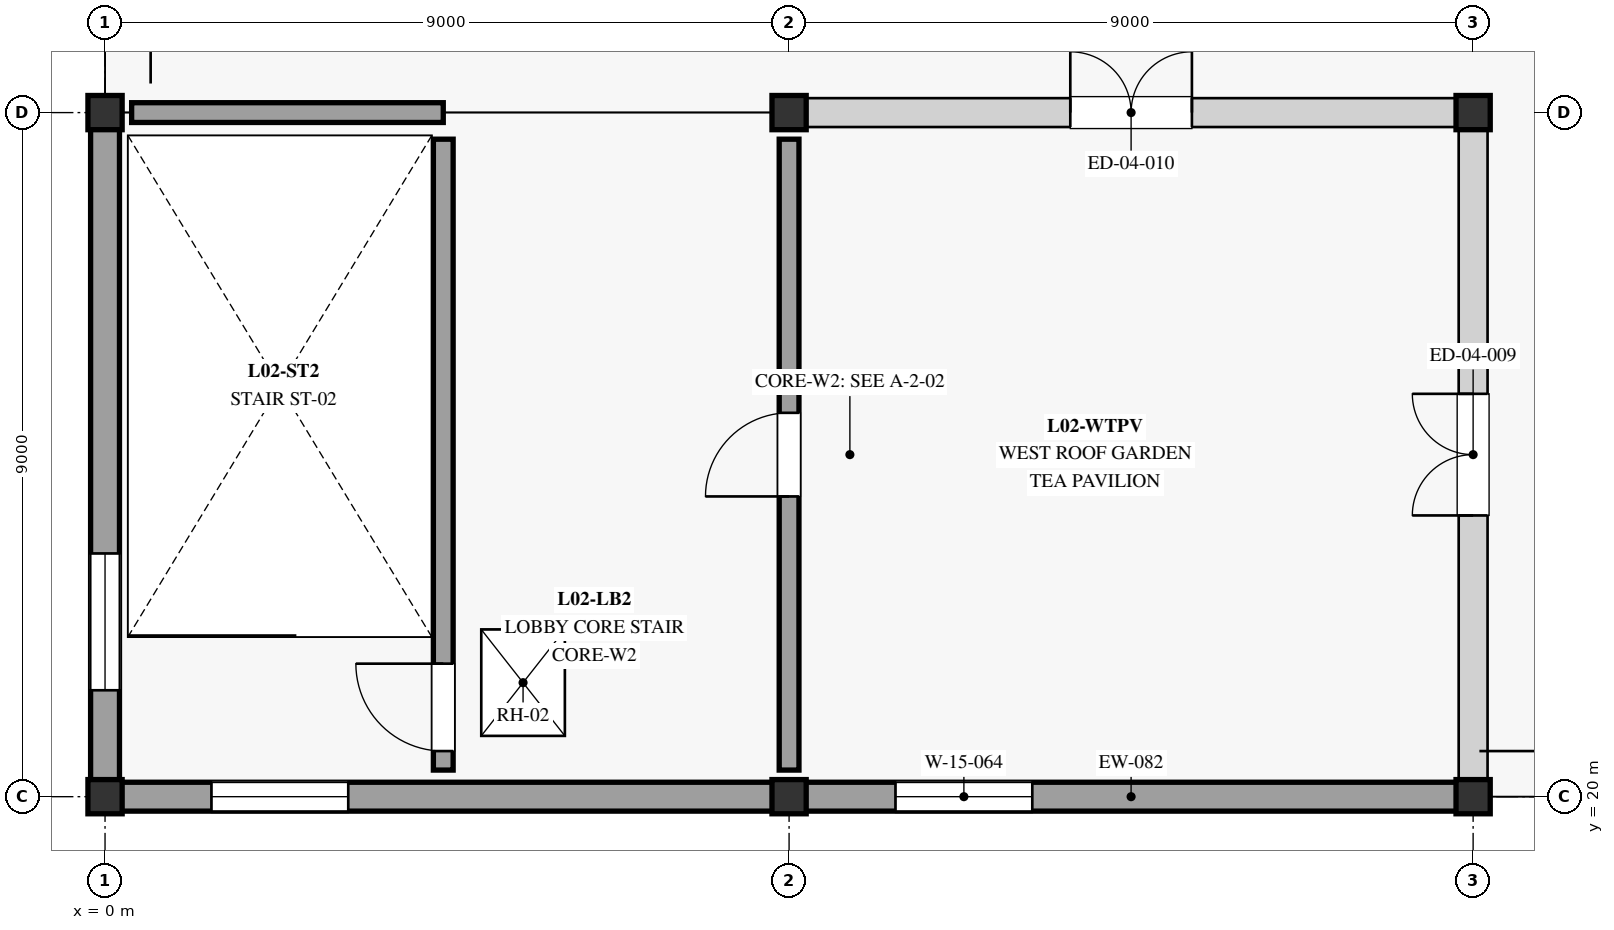
"""IFC4 building model, lengths in metres.
Left out: names, types, materials, properties, quantities, classifications, styles, units other than length and angle.
Written with IfcOpenShell. Run it as: python <this file> out.ifc"""

import sys

from ifc_helpers import new_model, si_unit, direction, frame, frame_2d, origin, origin_2d, place, context, subcontext, project, spatial, rectangle, extrude, element, fill, save


model = new_model("IFC4")
c1 = context("Model", 3, precision=1e-05, world=origin(), true_north=direction((0.0, 1.0)))
c2 = subcontext(c1, "Body", "Model", "MODEL_VIEW")
j1 = project(units=[si_unit("LENGTHUNIT", "METRE"), si_unit("PLANEANGLEUNIT", "RADIAN")], contexts=[c1])
p1 = place(None, origin())
s1 = spatial("IfcSite", under=j1, at=p1, CompositionType="ELEMENT")
p2 = place(p1, origin())
s2 = spatial("IfcBuilding", under=s1, at=p2, CompositionType="ELEMENT")
p3 = place(p2, frame((0.0, 0.0, 8.4)))
s3 = spatial("IfcBuildingStorey", under=s2, at=p3, CompositionType="ELEMENT", Elevation=8.4)
for number, where, z_axis, x_axis in (
    (1, (0.0, 20.0, 0.0), (0.0, 0.0, 1.0), (1.0, 0.0, 0.0)),
    (2, (0.0, 29.0, 0.0), (0.0, 0.0, 1.0), (1.0, 0.0, 0.0)),
    (3, (9.0, 20.0, 0.0), (0.0, 0.0, 1.0), (1.0, 0.0, 0.0)),
    (4, (9.0, 29.0, 0.0), (0.0, 0.0, 1.0), (1.0, 0.0, 0.0)),
    (5, (18.0, 20.0, 0.0), (0.0, 0.0, 1.0), (1.0, 0.0, 0.0)),
    (6, (18.0, 29.0, 0.0), (0.0, 0.0, 1.0), (1.0, 0.0, 0.0)),
):
    element("IfcColumn", number, at=place(p3, frame(where, z_axis=z_axis, x_axis=x_axis)), inside=s3, PredefinedType="COLUMN", context=c2, shape_type="SweptSolid", body=[
        extrude(rectangle(XDim=0.45, YDim=0.45, at=origin_2d()), origin(), (0.0, 0.0, 1.0), 3.29),
    ])
p4 = place(p3, frame((0.0, 20.0, 0.0), z_axis=(0.0, 0.0, 1.0), x_axis=(1.0, 0.0, 0.0)))
e7 = element("IfcWall", 7, at=p4, inside=s3, PredefinedType="STANDARD", context=c2, shape_type="SweptSolid", body=[
    extrude(rectangle(XDim=9.0, YDim=0.38, at=frame_2d((4.5, 0.0))), origin(), (0.0, 0.0, 1.0), 3.29),
])
p5 = place(p4, frame((1.4, 0.0, 1.0)))
e8 = element("IfcOpeningElement", 8, at=p5, cuts=e7, PredefinedType="OPENING", context=c2, shape_type="SweptSolid", body=[
    extrude(rectangle(XDim=1.8, YDim=1.6, at=frame_2d((0.9, 0.8))), frame((0.0, 0.2, 0.0), z_axis=(0.0, -1.0, 0.0), x_axis=(1.0, 0.0, 0.0)), (0.0, 0.0, 1.0), 0.4),
])
p6 = place(p3, frame((9.0, 20.0, 0.0), z_axis=(0.0, 0.0, 1.0), x_axis=(1.0, 0.0, 0.0)))
e9 = element("IfcWall", 9, at=p6, inside=s3, PredefinedType="STANDARD", context=c2, shape_type="SweptSolid", body=[
    extrude(rectangle(XDim=9.0, YDim=0.38, at=frame_2d((4.5, 0.0))), origin(), (0.0, 0.0, 1.0), 3.29),
])
p7 = place(p6, frame((1.4, 0.0, 1.0)))
e10 = element("IfcOpeningElement", 10, at=p7, cuts=e9, PredefinedType="OPENING", context=c2, shape_type="SweptSolid", body=[
    extrude(rectangle(XDim=1.8, YDim=1.6, at=frame_2d((0.9, 0.8))), frame((0.0, 0.2, 0.0), z_axis=(0.0, -1.0, 0.0), x_axis=(1.0, 0.0, 0.0)), (0.0, 0.0, 1.0), 0.4),
])
p8 = place(p3, frame((0.0, 20.0, 0.0), z_axis=(0.0, 0.0, 1.0), x_axis=(0.0, 1.0, 0.0)))
e11 = element("IfcWall", 11, at=p8, inside=s3, PredefinedType="STANDARD", context=c2, shape_type="SweptSolid", body=[
    extrude(rectangle(XDim=9.0, YDim=0.38, at=frame_2d((4.5, 0.0))), origin(), (0.0, 0.0, 1.0), 3.29),
])
p9 = place(p8, frame((1.4, 0.0, 1.0)))
e12 = element("IfcOpeningElement", 12, at=p9, cuts=e11, PredefinedType="OPENING", context=c2, shape_type="SweptSolid", body=[
    extrude(rectangle(XDim=1.8, YDim=1.6, at=frame_2d((0.9, 0.8))), frame((0.0, 0.2, 0.0), z_axis=(0.0, -1.0, 0.0), x_axis=(1.0, 0.0, 0.0)), (0.0, 0.0, 1.0), 0.4),
])
p10 = place(p3, frame((18.0, 20.0, 0.0), z_axis=(0.0, 0.0, 1.0), x_axis=(0.0, 1.0, 0.0)))
e13 = element("IfcWall", 13, at=p10, inside=s3, PredefinedType="STANDARD", context=c2, shape_type="SweptSolid", body=[
    extrude(rectangle(XDim=9.0, YDim=0.38, at=frame_2d((4.5, 0.0))), origin(), (0.0, 0.0, 1.0), 3.29),
])
p11 = place(p10, frame((3.7, 0.0, 0.0)))
e14 = element("IfcOpeningElement", 14, at=p11, cuts=e13, PredefinedType="OPENING", context=c2, shape_type="SweptSolid", body=[
    extrude(rectangle(XDim=1.6, YDim=2.3, at=frame_2d((0.8, 1.15))), frame((0.0, 0.2, 0.0), z_axis=(0.0, -1.0, 0.0), x_axis=(1.0, 0.0, 0.0)), (0.0, 0.0, 1.0), 0.4),
])
p12 = place(p3, frame((9.0, 29.0, 0.0), z_axis=(0.0, 0.0, 1.0), x_axis=(1.0, 0.0, 0.0)))
e15 = element("IfcWall", 15, at=p12, inside=s3, PredefinedType="STANDARD", context=c2, shape_type="SweptSolid", body=[
    extrude(rectangle(XDim=9.0, YDim=0.38, at=frame_2d((4.5, 0.0))), origin(), (0.0, 0.0, 1.0), 3.29),
])
p13 = place(p12, frame((3.7, 0.0, 0.0)))
e16 = element("IfcOpeningElement", 16, at=p13, cuts=e15, PredefinedType="OPENING", context=c2, shape_type="SweptSolid", body=[
    extrude(rectangle(XDim=1.6, YDim=2.3, at=frame_2d((0.8, 1.15))), frame((0.0, 0.2, 0.0), z_axis=(0.0, -1.0, 0.0), x_axis=(1.0, 0.0, 0.0)), (0.0, 0.0, 1.0), 0.4),
])
p14 = place(p3, frame((4.45, 20.35, 0.0), z_axis=(0.0, 0.0, 1.0), x_axis=(0.0, 1.0, 0.0)))
e17 = element("IfcWall", 17, at=p14, inside=s3, PredefinedType="SHEAR", context=c2, shape_type="SweptSolid", body=[
    extrude(rectangle(XDim=8.3, YDim=0.26, at=frame_2d((4.15, 0.0))), origin(), (0.0, 0.0, 1.0), 3.2),
])
p15 = place(p14, frame((0.25, 0.0, 0.0)))
e18 = element("IfcOpeningElement", 18, at=p15, cuts=e17, PredefinedType="OPENING", context=c2, shape_type="SweptSolid", body=[
    extrude(rectangle(XDim=1.15, YDim=2.15, at=frame_2d((0.575, 1.075))), frame((0.0, 0.14, 0.0), z_axis=(0.0, -1.0, 0.0), x_axis=(1.0, 0.0, 0.0)), (0.0, 0.0, 1.0), 0.28),
])
p16 = place(p3, frame((9.0, 20.35, 0.0), z_axis=(0.0, 0.0, 1.0), x_axis=(0.0, 1.0, 0.0)))
e19 = element("IfcWall", 19, at=p16, inside=s3, PredefinedType="SHEAR", context=c2, shape_type="SweptSolid", body=[
    extrude(rectangle(XDim=8.3, YDim=0.26, at=frame_2d((4.15, 0.0))), origin(), (0.0, 0.0, 1.0), 3.2),
])
p17 = place(p16, frame((3.6, 0.0, 0.0)))
e20 = element("IfcOpeningElement", 20, at=p17, cuts=e19, PredefinedType="OPENING", context=c2, shape_type="SweptSolid", body=[
    extrude(rectangle(XDim=1.1, YDim=2.1, at=frame_2d((0.55, 1.05))), frame((0.0, 0.14, 0.0), z_axis=(0.0, -1.0, 0.0), x_axis=(1.0, 0.0, 0.0)), (0.0, 0.0, 1.0), 0.28),
])
p18 = place(p3, frame((0.35, 29.0, 0.0), z_axis=(0.0, 0.0, 1.0), x_axis=(1.0, 0.0, 0.0)))
e21 = element("IfcWall", 21, at=p18, inside=s3, PredefinedType="SHEAR", context=c2, shape_type="SweptSolid", body=[
    extrude(rectangle(XDim=4.1, YDim=0.26, at=frame_2d((2.05, 0.0))), origin(), (0.0, 0.0, 1.0), 3.2),
])
p19 = place(p5, origin())
e22 = element("IfcWindow", 22, at=p19, inside=s3, PartitioningType="SINGLE_PANEL", PredefinedType="WINDOW", context=c2, shape_type="SweptSolid", body=[
    extrude(rectangle(XDim=1.8, YDim=1.6, at=frame_2d((0.9, 0.8))), frame((0.0, 0.03, 0.0), z_axis=(0.0, -1.0, 0.0), x_axis=(1.0, 0.0, 0.0)), (0.0, 0.0, 1.0), 0.06),
])
fill(e8, e22)
p20 = place(p7, origin())
e23 = element("IfcWindow", 23, at=p20, inside=s3, PartitioningType="SINGLE_PANEL", PredefinedType="WINDOW", context=c2, shape_type="SweptSolid", body=[
    extrude(rectangle(XDim=1.8, YDim=1.6, at=frame_2d((0.9, 0.8))), frame((0.0, 0.03, 0.0), z_axis=(0.0, -1.0, 0.0), x_axis=(1.0, 0.0, 0.0)), (0.0, 0.0, 1.0), 0.06),
])
fill(e10, e23)
p21 = place(p9, origin())
e24 = element("IfcWindow", 24, at=p21, inside=s3, PartitioningType="SINGLE_PANEL", PredefinedType="WINDOW", context=c2, shape_type="SweptSolid", body=[
    extrude(rectangle(XDim=1.8, YDim=1.6, at=frame_2d((0.9, 0.8))), frame((0.0, 0.03, 0.0), z_axis=(0.0, -1.0, 0.0), x_axis=(1.0, 0.0, 0.0)), (0.0, 0.0, 1.0), 0.06),
])
fill(e12, e24)
p22 = place(p11, origin())
e25 = element("IfcDoor", 25, at=p22, inside=s3, OperationType="DOUBLE_DOOR_SINGLE_SWING", PredefinedType="DOOR", context=c2, shape_type="SweptSolid", body=[
    extrude(rectangle(XDim=1.6, YDim=2.3, at=frame_2d((0.8, 1.15))), frame((0.0, 0.025, 0.0), z_axis=(0.0, -1.0, 0.0), x_axis=(1.0, 0.0, 0.0)), (0.0, 0.0, 1.0), 0.05),
])
fill(e14, e25)
p23 = place(p13, origin())
e26 = element("IfcDoor", 26, at=p23, inside=s3, OperationType="DOUBLE_DOOR_SINGLE_SWING", PredefinedType="DOOR", context=c2, shape_type="SweptSolid", body=[
    extrude(rectangle(XDim=1.6, YDim=2.3, at=frame_2d((0.8, 1.15))), frame((0.0, 0.025, 0.0), z_axis=(0.0, -1.0, 0.0), x_axis=(1.0, 0.0, 0.0)), (0.0, 0.0, 1.0), 0.05),
])
fill(e16, e26)
p24 = place(p3, frame((0.0, 0.0, 3.29)))
p25 = place(p24, frame((5.5, 21.5, -0.01)))
p26 = place(p25, frame((0.0, 0.0, 0.27)))
e27 = element("IfcDoor", 27, at=p26, inside=s3, OperationType="SINGLE_SWING_LEFT", PredefinedType="TRAPDOOR", context=c2, shape_type="SweptSolid", body=[
    extrude(rectangle(XDim=1.1, YDim=1.4, at=origin_2d()), origin(), (0.0, 0.0, 1.0), 0.05),
])
p27 = place(p15, origin())
e28 = element("IfcDoor", 28, at=p27, inside=s3, OperationType="SINGLE_SWING_RIGHT", PredefinedType="DOOR", context=c2, shape_type="SweptSolid", body=[
    extrude(rectangle(XDim=1.15, YDim=2.15, at=frame_2d((0.575, 1.075))), frame((0.0, 0.025, 0.0), z_axis=(0.0, -1.0, 0.0), x_axis=(1.0, 0.0, 0.0)), (0.0, 0.0, 1.0), 0.05),
])
fill(e18, e28)
p28 = place(p17, origin())
e29 = element("IfcDoor", 29, at=p28, inside=s3, OperationType="SINGLE_SWING_LEFT", PredefinedType="DOOR", context=c2, shape_type="SweptSolid", body=[
    extrude(rectangle(XDim=1.1, YDim=2.1, at=frame_2d((0.55, 1.05))), frame((0.0, 0.025, 0.0), z_axis=(0.0, -1.0, 0.0), x_axis=(1.0, 0.0, 0.0)), (0.0, 0.0, 1.0), 0.05),
])
fill(e20, e29)
save(model, sys.argv[1])
